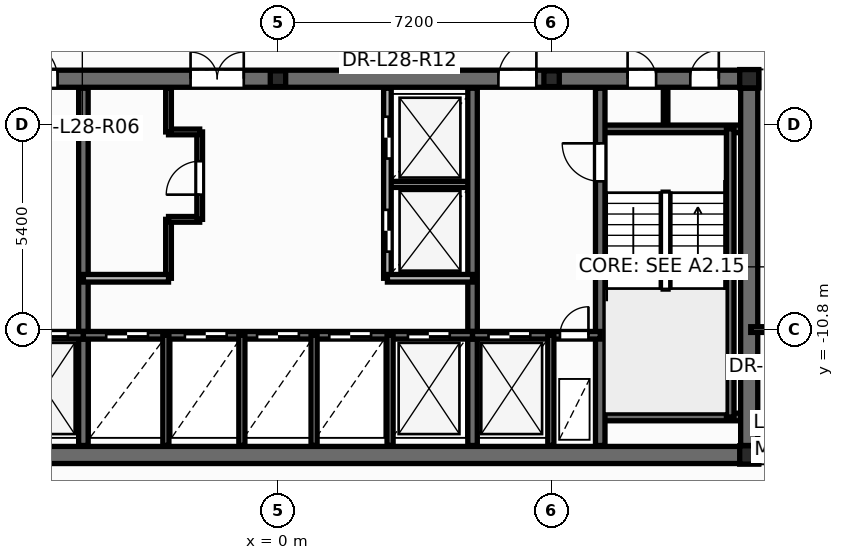
"""IFC4 building model, lengths in metres.
Left out: names, types, materials, properties, quantities, classifications, styles, units other than length and angle.
Written with IfcOpenShell. Run it as: python <this file> out.ifc"""

import sys

from ifc_helpers import new_model, si_unit, direction, frame, frame_2d, origin, origin_2d, place, context, subcontext, project, spatial, rectangle, i_section, extrude, element, fill, save


model = new_model("IFC4")
c1 = context("Model", 3, precision=1e-05, world=origin(), true_north=direction((0.0, 1.0)))
c2 = subcontext(c1, "Body", "Model", "MODEL_VIEW")
j1 = project(units=[si_unit("LENGTHUNIT", "METRE"), si_unit("PLANEANGLEUNIT", "RADIAN")], contexts=[c1])
p1 = place(None, origin())
s1 = spatial("IfcSite", under=j1, at=p1, CompositionType="ELEMENT")
p2 = place(p1, origin())
s2 = spatial("IfcBuilding", under=s1, at=p2, CompositionType="ELEMENT")
p3 = place(p2, frame((0.0, 0.0, 110.4)))
s3 = spatial("IfcBuildingStorey", under=s2, at=p3, CompositionType="ELEMENT", Elevation=110.4)
for number, where, z_axis, x_axis in (
    (1, (12.4, -14.1, 0.0), (0.0, 0.0, 1.0), (1.0, 0.0, 0.0)),
    (2, (12.4, -4.2, 0.0), (0.0, 0.0, 1.0), (1.0, 0.0, 0.0)),
):
    element("IfcColumn", number, at=place(p3, frame(where, z_axis=z_axis, x_axis=x_axis)), inside=s3, PredefinedType="COLUMN", context=c2, shape_type="SweptSolid", body=[
        extrude(i_section(OverallWidth=0.5, OverallDepth=0.482, WebThickness=0.04, FlangeThickness=0.045, at=origin_2d()), origin(), (0.0, 0.0, 1.0), 3.6),
    ])
for number, where, z_axis, x_axis in (
    (3, (0.0, -4.2, 0.0), (0.0, 0.0, 1.0), (1.0, 0.0, 0.0)),
    (4, (7.2, -4.2, 0.0), (0.0, 0.0, 1.0), (1.0, 0.0, 0.0)),
):
    element("IfcColumn", number, at=place(p3, frame(where, z_axis=z_axis, x_axis=x_axis)), inside=s3, PredefinedType="PILASTER", context=c2, shape_type="SweptSolid", body=[
        extrude(i_section(OverallWidth=0.405, OverallDepth=0.414, WebThickness=0.022, FlangeThickness=0.032, at=origin_2d()), origin(), (0.0, 0.0, 1.0), 3.6),
    ])
p4 = place(p3, frame((-2.88, -9.45, 0.0), z_axis=(0.0, 0.0, 1.0), x_axis=(0.0, 1.0, 0.0)))
e5 = element("IfcWall", 5, at=p4, inside=s3, PredefinedType="PARTITIONING", context=c2, shape_type="SweptSolid", body=[
    extrude(rectangle(XDim=1.55, YDim=0.15, at=frame_2d((0.775, 0.0))), origin(), (0.0, 0.0, 1.0), 3.35),
])
p5 = place(p3, frame((-2.88, -7.9, 0.0), z_axis=(0.0, 0.0, 1.0), x_axis=(1.0, 0.0, 0.0)))
e6 = element("IfcWall", 6, at=p5, inside=s3, PredefinedType="PARTITIONING", context=c2, shape_type="SweptSolid", body=[
    extrude(rectangle(XDim=0.82, YDim=0.15, at=frame_2d((0.41, 0.0))), origin(), (0.0, 0.0, 1.0), 3.35),
])
p6 = place(p3, frame((-2.06, -7.9, 0.0), z_axis=(0.0, 0.0, 1.0), x_axis=(0.0, 1.0, 0.0)))
e7 = element("IfcWall", 7, at=p6, inside=s3, PredefinedType="PARTITIONING", context=c2, shape_type="SweptSolid", body=[
    extrude(rectangle(XDim=2.3, YDim=0.15, at=frame_2d((1.15, 0.0))), origin(), (0.0, 0.0, 1.0), 3.35),
])
p7 = place(p6, frame((0.65, 0.0, 0.0)))
e8 = element("IfcOpeningElement", 8, at=p7, cuts=e7, PredefinedType="OPENING", context=c2, shape_type="SweptSolid", body=[
    extrude(rectangle(XDim=0.886, YDim=2.104, at=frame_2d((0.44, 1.052))), frame((0.0, 0.085, 0.0), z_axis=(0.0, -1.0, 0.0), x_axis=(1.0, 0.0, 0.0)), (0.0, 0.0, 1.0), 0.17),
])
p8 = place(p3, frame((-2.88, -5.6, 0.0), z_axis=(0.0, 0.0, 1.0), x_axis=(1.0, 0.0, 0.0)))
e9 = element("IfcWall", 9, at=p8, inside=s3, PredefinedType="PARTITIONING", context=c2, shape_type="SweptSolid", body=[
    extrude(rectangle(XDim=0.82, YDim=0.15, at=frame_2d((0.41, 0.0))), origin(), (0.0, 0.0, 1.0), 3.35),
])
p9 = place(p3, frame((-2.88, -5.6, 0.0), z_axis=(0.0, 0.0, 1.0), x_axis=(0.0, 1.0, 0.0)))
e10 = element("IfcWall", 10, at=p9, inside=s3, PredefinedType="PARTITIONING", context=c2, shape_type="SweptSolid", body=[
    extrude(rectangle(XDim=1.15, YDim=0.15, at=frame_2d((0.575, 0.0))), origin(), (0.0, 0.0, 1.0), 3.35),
])
p10 = place(p3, frame((2.88, -6.98, 0.0), z_axis=(0.0, 0.0, 1.0), x_axis=(1.0, 0.0, 0.0)))
e11 = element("IfcWall", 11, at=p10, inside=s3, PredefinedType="PARTITIONING", context=c2, shape_type="SweptSolid", body=[
    extrude(rectangle(XDim=2.24, YDim=0.16, at=frame_2d((1.12, 0.0))), origin(), (0.0, 0.0, 1.0), 3.35),
])
p11 = place(p3, frame((10.2, -5.52, 0.0), z_axis=(0.0, 0.0, 1.0), x_axis=(0.0, 1.0, 0.0)))
e12 = element("IfcWall", 12, at=p11, inside=s3, PredefinedType="PARTITIONING", context=c2, shape_type="SweptSolid", body=[
    extrude(rectangle(XDim=1.12, YDim=0.12, at=frame_2d((0.56, 0.0))), origin(), (0.0, 0.0, 1.0), 3.35),
])
p12 = place(p3, frame((-12.65, -14.1, 0.0), z_axis=(0.0, 0.0, 1.0), x_axis=(1.0, 0.0, 0.0)))
e13 = element("IfcWall", 13, at=p12, inside=s3, PredefinedType="SHEAR", context=c2, shape_type="SweptSolid", body=[
    extrude(rectangle(XDim=25.3, YDim=0.45, at=frame_2d((12.65, 0.0))), origin(), (0.0, 0.0, 1.0), 3.6),
])
p13 = place(p3, frame((-12.65, -4.2, 0.0), z_axis=(0.0, 0.0, 1.0), x_axis=(1.0, 0.0, 0.0)))
e14 = element("IfcWall", 14, at=p13, inside=s3, PredefinedType="SHEAR", context=c2, shape_type="SweptSolid", body=[
    extrude(rectangle(XDim=25.3, YDim=0.45, at=frame_2d((12.65, 0.0))), origin(), (0.0, 0.0, 1.0), 3.6),
])
p14 = place(p13, frame((1.85, 0.0, 0.0)))
e15 = element("IfcOpeningElement", 15, at=p14, cuts=e14, PredefinedType="OPENING", context=c2, shape_type="SweptSolid", body=[
    extrude(rectangle(XDim=0.756, YDim=2.054, at=frame_2d((0.375, 1.027))), frame((0.0, 0.235, 0.0), z_axis=(0.0, -1.0, 0.0), x_axis=(1.0, 0.0, 0.0)), (0.0, 0.0, 1.0), 0.47),
])
p15 = place(p13, frame((21.85, 0.0, 0.0)))
e16 = element("IfcOpeningElement", 16, at=p15, cuts=e14, PredefinedType="OPENING", context=c2, shape_type="SweptSolid", body=[
    extrude(rectangle(XDim=0.756, YDim=2.054, at=frame_2d((0.375, 1.027))), frame((0.0, 0.235, 0.0), z_axis=(0.0, -1.0, 0.0), x_axis=(1.0, 0.0, 0.0)), (0.0, 0.0, 1.0), 0.47),
])
p16 = place(p13, frame((23.5, 0.0, 0.0)))
e17 = element("IfcOpeningElement", 17, at=p16, cuts=e14, PredefinedType="OPENING", context=c2, shape_type="SweptSolid", body=[
    extrude(rectangle(XDim=0.756, YDim=2.054, at=frame_2d((0.375, 1.027))), frame((0.0, 0.235, 0.0), z_axis=(0.0, -1.0, 0.0), x_axis=(1.0, 0.0, 0.0)), (0.0, 0.0, 1.0), 0.47),
])
p17 = place(p13, frame((5.85, 0.0, 0.0)))
e18 = element("IfcOpeningElement", 18, at=p17, cuts=e14, PredefinedType="OPENING", context=c2, shape_type="SweptSolid", body=[
    extrude(rectangle(XDim=1.006, YDim=2.104, at=frame_2d((0.5, 1.052))), frame((0.0, 0.235, 0.0), z_axis=(0.0, -1.0, 0.0), x_axis=(1.0, 0.0, 0.0)), (0.0, 0.0, 1.0), 0.47),
])
p18 = place(p13, frame((10.35, 0.0, 0.0)))
e19 = element("IfcOpeningElement", 19, at=p18, cuts=e14, PredefinedType="OPENING", context=c2, shape_type="SweptSolid", body=[
    extrude(rectangle(XDim=1.406, YDim=2.154, at=frame_2d((0.7, 1.077))), frame((0.0, 0.235, 0.0), z_axis=(0.0, -1.0, 0.0), x_axis=(1.0, 0.0, 0.0)), (0.0, 0.0, 1.0), 0.47),
])
p19 = place(p13, frame((18.45, 0.0, 0.0)))
e20 = element("IfcOpeningElement", 20, at=p19, cuts=e14, PredefinedType="OPENING", context=c2, shape_type="SweptSolid", body=[
    extrude(rectangle(XDim=1.006, YDim=2.104, at=frame_2d((0.5, 1.052))), frame((0.0, 0.235, 0.0), z_axis=(0.0, -1.0, 0.0), x_axis=(1.0, 0.0, 0.0)), (0.0, 0.0, 1.0), 0.47),
])
for number, where, z_axis, x_axis in (
    (21, (8.48, -5.52, 0.0), (0.0, 0.0, 1.0), (1.0, 0.0, 0.0)),
    (22, (8.48, -13.1, 0.0), (0.0, 0.0, 1.0), (1.0, 0.0, 0.0)),
):
    element("IfcWall", number, at=place(p3, frame(where, z_axis=z_axis, x_axis=x_axis)), inside=s3, PredefinedType="SOLIDWALL", context=c2, shape_type="SweptSolid", body=[
        extrude(rectangle(XDim=3.87, YDim=0.2, at=frame_2d((1.935, 0.0))), origin(), (0.0, 0.0, 1.0), 3.6),
    ])
p20 = place(p3, frame((11.9, -13.1, 0.0), z_axis=(0.0, 0.0, 1.0), x_axis=(0.0, 1.0, 0.0)))
e23 = element("IfcWall", 23, at=p20, inside=s3, PredefinedType="SOLIDWALL", context=c2, shape_type="SweptSolid", body=[
    extrude(rectangle(XDim=7.58, YDim=0.2, at=frame_2d((3.79, 0.0))), origin(), (0.0, 0.0, 1.0), 3.6),
])
p21 = place(p3, frame((8.48, -13.85, 0.0), z_axis=(0.0, 0.0, 1.0), x_axis=(0.0, 1.0, 0.0)))
e24 = element("IfcWall", 24, at=p21, inside=s3, PredefinedType="SHEAR", context=c2, shape_type="SweptSolid", body=[
    extrude(rectangle(XDim=9.4, YDim=0.25, at=frame_2d((4.7, 0.0))), origin(), (0.0, 0.0, 1.0), 3.6),
])
p22 = place(p21, frame((6.95, 0.0, 0.0)))
e25 = element("IfcOpeningElement", 25, at=p22, cuts=e24, PredefinedType="OPENING", context=c2, shape_type="SweptSolid", body=[
    extrude(rectangle(XDim=1.006, YDim=2.104, at=frame_2d((0.5, 1.052))), frame((0.0, 0.135, 0.0), z_axis=(0.0, -1.0, 0.0), x_axis=(1.0, 0.0, 0.0)), (0.0, 0.0, 1.0), 0.27),
])
for number, where, z_axis, x_axis in (
    (26, (-5.12, -13.85, 0.0), (0.0, 0.0, 1.0), (0.0, 1.0, 0.0)),
    (27, (5.12, -13.85, 0.0), (0.0, 0.0, 1.0), (0.0, 1.0, 0.0)),
):
    element("IfcWall", number, at=place(p3, frame(where, z_axis=z_axis, x_axis=x_axis)), inside=s3, PredefinedType="SHEAR", context=c2, shape_type="SweptSolid", body=[
        extrude(rectangle(XDim=9.4, YDim=0.25, at=frame_2d((4.7, 0.0))), origin(), (0.0, 0.0, 1.0), 3.6),
    ])
p23 = place(p3, frame((-8.48, -10.95, 0.0), z_axis=(0.0, 0.0, 1.0), x_axis=(1.0, 0.0, 0.0)))
e28 = element("IfcWall", 28, at=p23, inside=s3, PredefinedType="SOLIDWALL", context=c2, shape_type="SweptSolid", body=[
    extrude(rectangle(XDim=3.36, YDim=0.2, at=frame_2d((1.68, 0.0))), origin(), (0.0, 0.0, 1.0), 3.6),
])
p24 = place(p23, frame((0.28, 0.0, 0.0)))
e29 = element("IfcOpeningElement", 29, at=p24, cuts=e28, PredefinedType="OPENING", context=c2, shape_type="SweptSolid", body=[
    extrude(rectangle(XDim=0.756, YDim=2.054, at=frame_2d((0.375, 1.027))), frame((0.0, 0.11, 0.0), z_axis=(0.0, -1.0, 0.0), x_axis=(1.0, 0.0, 0.0)), (0.0, 0.0, 1.0), 0.22),
])
p25 = place(p23, frame((1.85, 0.0, 0.0)))
e30 = element("IfcOpeningElement", 30, at=p25, cuts=e28, PredefinedType="OPENING", context=c2, shape_type="SweptSolid", body=[
    extrude(rectangle(XDim=1.106, YDim=2.104, at=frame_2d((0.55, 1.052))), frame((0.0, 0.11, 0.0), z_axis=(0.0, -1.0, 0.0), x_axis=(1.0, 0.0, 0.0)), (0.0, 0.0, 1.0), 0.22),
])
p26 = place(p3, frame((-5.12, -10.95, 0.0), z_axis=(0.0, 0.0, 1.0), x_axis=(1.0, 0.0, 0.0)))
e31 = element("IfcWall", 31, at=p26, inside=s3, PredefinedType="SOLIDWALL", context=c2, shape_type="SweptSolid", body=[
    extrude(rectangle(XDim=10.24, YDim=0.2, at=frame_2d((5.12, 0.0))), origin(), (0.0, 0.0, 1.0), 3.6),
])
p27 = place(p26, frame((0.6, 0.0, 0.0)))
e32 = element("IfcOpeningElement", 32, at=p27, cuts=e31, PredefinedType="OPENING", context=c2, shape_type="SweptSolid", body=[
    extrude(rectangle(XDim=1.106, YDim=2.104, at=frame_2d((0.55, 1.052))), frame((0.0, 0.11, 0.0), z_axis=(0.0, -1.0, 0.0), x_axis=(1.0, 0.0, 0.0)), (0.0, 0.0, 1.0), 0.22),
])
p28 = place(p26, frame((2.67, 0.0, 0.0)))
e33 = element("IfcOpeningElement", 33, at=p28, cuts=e31, PredefinedType="OPENING", context=c2, shape_type="SweptSolid", body=[
    extrude(rectangle(XDim=1.106, YDim=2.104, at=frame_2d((0.55, 1.052))), frame((0.0, 0.11, 0.0), z_axis=(0.0, -1.0, 0.0), x_axis=(1.0, 0.0, 0.0)), (0.0, 0.0, 1.0), 0.22),
])
p29 = place(p26, frame((4.57, 0.0, 0.0)))
e34 = element("IfcOpeningElement", 34, at=p29, cuts=e31, PredefinedType="OPENING", context=c2, shape_type="SweptSolid", body=[
    extrude(rectangle(XDim=1.106, YDim=2.104, at=frame_2d((0.55, 1.052))), frame((0.0, 0.11, 0.0), z_axis=(0.0, -1.0, 0.0), x_axis=(1.0, 0.0, 0.0)), (0.0, 0.0, 1.0), 0.22),
])
p30 = place(p26, frame((6.47, 0.0, 0.0)))
e35 = element("IfcOpeningElement", 35, at=p30, cuts=e31, PredefinedType="OPENING", context=c2, shape_type="SweptSolid", body=[
    extrude(rectangle(XDim=1.106, YDim=2.104, at=frame_2d((0.55, 1.052))), frame((0.0, 0.11, 0.0), z_axis=(0.0, -1.0, 0.0), x_axis=(1.0, 0.0, 0.0)), (0.0, 0.0, 1.0), 0.22),
])
p31 = place(p26, frame((8.54, 0.0, 0.0)))
e36 = element("IfcOpeningElement", 36, at=p31, cuts=e31, PredefinedType="OPENING", context=c2, shape_type="SweptSolid", body=[
    extrude(rectangle(XDim=1.106, YDim=2.104, at=frame_2d((0.55, 1.052))), frame((0.0, 0.11, 0.0), z_axis=(0.0, -1.0, 0.0), x_axis=(1.0, 0.0, 0.0)), (0.0, 0.0, 1.0), 0.22),
])
p32 = place(p3, frame((5.12, -10.95, 0.0), z_axis=(0.0, 0.0, 1.0), x_axis=(1.0, 0.0, 0.0)))
e37 = element("IfcWall", 37, at=p32, inside=s3, PredefinedType="SOLIDWALL", context=c2, shape_type="SweptSolid", body=[
    extrude(rectangle(XDim=3.36, YDim=0.2, at=frame_2d((1.68, 0.0))), origin(), (0.0, 0.0, 1.0), 3.6),
])
p33 = place(p32, frame((0.42, 0.0, 0.0)))
e38 = element("IfcOpeningElement", 38, at=p33, cuts=e37, PredefinedType="OPENING", context=c2, shape_type="SweptSolid", body=[
    extrude(rectangle(XDim=1.106, YDim=2.104, at=frame_2d((0.55, 1.052))), frame((0.0, 0.11, 0.0), z_axis=(0.0, -1.0, 0.0), x_axis=(1.0, 0.0, 0.0)), (0.0, 0.0, 1.0), 0.22),
])
p34 = place(p32, frame((2.3, 0.0, 0.0)))
e39 = element("IfcOpeningElement", 39, at=p34, cuts=e37, PredefinedType="OPENING", context=c2, shape_type="SweptSolid", body=[
    extrude(rectangle(XDim=0.756, YDim=2.054, at=frame_2d((0.375, 1.027))), frame((0.0, 0.11, 0.0), z_axis=(0.0, -1.0, 0.0), x_axis=(1.0, 0.0, 0.0)), (0.0, 0.0, 1.0), 0.22),
])
for number, where, z_axis, x_axis in (
    (40, (7.18, -13.85, 0.0), (0.0, 0.0, 1.0), (0.0, 1.0, 0.0)),
    (41, (-2.95, -13.85, 0.0), (0.0, 0.0, 1.0), (0.0, 1.0, 0.0)),
    (42, (2.95, -13.85, 0.0), (0.0, 0.0, 1.0), (0.0, 1.0, 0.0)),
):
    element("IfcWall", number, at=place(p3, frame(where, z_axis=z_axis, x_axis=x_axis)), inside=s3, PredefinedType="PARTITIONING", context=c2, shape_type="SweptSolid", body=[
        extrude(rectangle(XDim=2.9, YDim=0.16, at=frame_2d((1.45, 0.0))), origin(), (0.0, 0.0, 1.0), 2.375),
    ])
p35 = place(p3, frame((12.4, -13.85, 0.0), z_axis=(0.0, 0.0, 1.0), x_axis=(0.0, 1.0, 0.0)))
e43 = element("IfcWall", 43, at=p35, inside=s3, PredefinedType="SHEAR", context=c2, shape_type="SweptSolid", body=[
    extrude(rectangle(XDim=9.4, YDim=0.45, at=frame_2d((4.7, 0.0))), origin(), (0.0, 0.0, 1.0), 3.6),
])
p36 = place(p3, frame((-5.12, -9.45, 0.0), z_axis=(0.0, 0.0, 1.0), x_axis=(1.0, 0.0, 0.0)))
e44 = element("IfcWall", 44, at=p36, inside=s3, PredefinedType="SOLIDWALL", context=c2, shape_type="SweptSolid", body=[
    extrude(rectangle(XDim=2.24, YDim=0.2, at=frame_2d((1.12, 0.0))), origin(), (0.0, 0.0, 1.0), 3.35),
])
p37 = place(p3, frame((2.88, -9.45, 0.0), z_axis=(0.0, 0.0, 1.0), x_axis=(0.0, 1.0, 0.0)))
e45 = element("IfcWall", 45, at=p37, inside=s3, PredefinedType="SOLIDWALL", context=c2, shape_type="SweptSolid", body=[
    extrude(rectangle(XDim=5.0, YDim=0.2, at=frame_2d((2.5, 0.0))), origin(), (0.0, 0.0, 1.0), 3.35),
])
p38 = place(p37, frame((0.7, 0.0, 0.0)))
e46 = element("IfcOpeningElement", 46, at=p38, cuts=e45, PredefinedType="OPENING", context=c2, shape_type="SweptSolid", body=[
    extrude(rectangle(XDim=1.106, YDim=2.104, at=frame_2d((0.55, 1.052))), frame((0.0, 0.11, 0.0), z_axis=(0.0, -1.0, 0.0), x_axis=(1.0, 0.0, 0.0)), (0.0, 0.0, 1.0), 0.22),
])
p39 = place(p37, frame((3.15, 0.0, 0.0)))
e47 = element("IfcOpeningElement", 47, at=p39, cuts=e45, PredefinedType="OPENING", context=c2, shape_type="SweptSolid", body=[
    extrude(rectangle(XDim=1.106, YDim=2.104, at=frame_2d((0.55, 1.052))), frame((0.0, 0.11, 0.0), z_axis=(0.0, -1.0, 0.0), x_axis=(1.0, 0.0, 0.0)), (0.0, 0.0, 1.0), 0.22),
])
p40 = place(p3, frame((2.88, -9.45, 0.0), z_axis=(0.0, 0.0, 1.0), x_axis=(1.0, 0.0, 0.0)))
e48 = element("IfcWall", 48, at=p40, inside=s3, PredefinedType="SOLIDWALL", context=c2, shape_type="SweptSolid", body=[
    extrude(rectangle(XDim=2.24, YDim=0.2, at=frame_2d((1.12, 0.0))), origin(), (0.0, 0.0, 1.0), 3.35),
])
for number, where, z_axis, x_axis in (
    (49, (-0.95, -13.85, 0.0), (0.0, 0.0, 1.0), (0.0, 1.0, 0.0)),
    (50, (0.95, -13.85, 0.0), (0.0, 0.0, 1.0), (0.0, 1.0, 0.0)),
):
    element("IfcWall", number, at=place(p3, frame(where, z_axis=z_axis, x_axis=x_axis)), inside=s3, PredefinedType="PARTITIONING", context=c2, shape_type="SweptSolid", body=[
        extrude(rectangle(XDim=2.9, YDim=0.16, at=frame_2d((1.45, 0.0))), origin(), (0.0, 0.0, 1.0), 2.375),
    ])
p41 = place(p3, frame((12.44, -10.8, 0.0), z_axis=(0.0, 0.0, 1.0), x_axis=(1.0, 0.0, 0.0)))
e51 = element("IfcWall", 51, at=p41, inside=s3, PredefinedType="PARTITIONING", context=c2, shape_type="SweptSolid", body=[
    extrude(rectangle(XDim=2.2, YDim=0.15, at=frame_2d((1.1, 0.0))), origin(), (0.0, 0.0, 1.0), 2.713),
])
p42 = place(p41, frame((0.459, 0.0, 0.0)))
e52 = element("IfcOpeningElement", 52, at=p42, cuts=e51, PredefinedType="OPENING", context=c2, shape_type="SweptSolid", body=[
    extrude(rectangle(XDim=0.956, YDim=2.104, at=frame_2d((0.475, 1.052))), frame((0.0, 0.085, 0.0), z_axis=(0.0, -1.0, 0.0), x_axis=(1.0, 0.0, 0.0)), (0.0, 0.0, 1.0), 0.17),
])
p43 = place(p7, origin())
e53 = element("IfcDoor", 53, at=p43, inside=s3, OperationType="SINGLE_SWING_LEFT", PredefinedType="DOOR", context=c2, shape_type="SweptSolid", body=[
    extrude(rectangle(XDim=0.88, YDim=2.1, at=frame_2d((0.44, 1.05))), frame((0.0, 0.025, 0.0), z_axis=(0.0, -1.0, 0.0), x_axis=(1.0, 0.0, 0.0)), (0.0, 0.0, 1.0), 0.05),
])
fill(e8, e53)
p44 = place(p38, origin())
e54 = element("IfcDoor", 54, at=p44, inside=s3, OperationType="DOUBLE_DOOR_SLIDING", PredefinedType="DOOR", context=c2, shape_type="SweptSolid", body=[
    extrude(rectangle(XDim=1.1, YDim=2.1, at=frame_2d((0.55, 1.05))), frame((0.0, 0.025, 0.0), z_axis=(0.0, -1.0, 0.0), x_axis=(1.0, 0.0, 0.0)), (0.0, 0.0, 1.0), 0.05),
])
fill(e46, e54)
p45 = place(p39, origin())
e55 = element("IfcDoor", 55, at=p45, inside=s3, OperationType="DOUBLE_DOOR_SLIDING", PredefinedType="DOOR", context=c2, shape_type="SweptSolid", body=[
    extrude(rectangle(XDim=1.1, YDim=2.1, at=frame_2d((0.55, 1.05))), frame((0.0, 0.025, 0.0), z_axis=(0.0, -1.0, 0.0), x_axis=(1.0, 0.0, 0.0)), (0.0, 0.0, 1.0), 0.05),
])
fill(e47, e55)
p46 = place(p22, origin())
e56 = element("IfcDoor", 56, at=p46, inside=s3, OperationType="SINGLE_SWING_RIGHT", PredefinedType="DOOR", context=c2, shape_type="SweptSolid", body=[
    extrude(rectangle(XDim=1.0, YDim=2.1, at=frame_2d((0.5, 1.05))), frame((0.0, 0.025, 0.0), z_axis=(0.0, -1.0, 0.0), x_axis=(1.0, 0.0, 0.0)), (0.0, 0.0, 1.0), 0.05),
])
fill(e25, e56)
p47 = place(p25, origin())
e57 = element("IfcDoor", 57, at=p47, inside=s3, OperationType="DOUBLE_DOOR_SLIDING", PredefinedType="DOOR", context=c2, shape_type="SweptSolid", body=[
    extrude(rectangle(XDim=1.1, YDim=2.1, at=frame_2d((0.55, 1.05))), frame((0.0, 0.025, 0.0), z_axis=(0.0, -1.0, 0.0), x_axis=(1.0, 0.0, 0.0)), (0.0, 0.0, 1.0), 0.05),
])
fill(e30, e57)
p48 = place(p33, origin())
e58 = element("IfcDoor", 58, at=p48, inside=s3, OperationType="DOUBLE_DOOR_SLIDING", PredefinedType="DOOR", context=c2, shape_type="SweptSolid", body=[
    extrude(rectangle(XDim=1.1, YDim=2.1, at=frame_2d((0.55, 1.05))), frame((0.0, 0.025, 0.0), z_axis=(0.0, -1.0, 0.0), x_axis=(1.0, 0.0, 0.0)), (0.0, 0.0, 1.0), 0.05),
])
fill(e38, e58)
p49 = place(p34, origin())
e59 = element("IfcDoor", 59, at=p49, inside=s3, OperationType="SINGLE_SWING_RIGHT", PredefinedType="DOOR", context=c2, shape_type="SweptSolid", body=[
    extrude(rectangle(XDim=0.75, YDim=2.05, at=frame_2d((0.375, 1.025))), frame((0.0, 0.025, 0.0), z_axis=(0.0, -1.0, 0.0), x_axis=(1.0, 0.0, 0.0)), (0.0, 0.0, 1.0), 0.05),
])
fill(e39, e59)
p50 = place(p27, origin())
e60 = element("IfcDoor", 60, at=p50, inside=s3, OperationType="DOUBLE_DOOR_SLIDING", PredefinedType="DOOR", context=c2, shape_type="SweptSolid", body=[
    extrude(rectangle(XDim=1.1, YDim=2.1, at=frame_2d((0.55, 1.05))), frame((0.0, 0.025, 0.0), z_axis=(0.0, -1.0, 0.0), x_axis=(1.0, 0.0, 0.0)), (0.0, 0.0, 1.0), 0.05),
])
fill(e32, e60)
p51 = place(p28, origin())
e61 = element("IfcDoor", 61, at=p51, inside=s3, OperationType="DOUBLE_DOOR_SLIDING", PredefinedType="DOOR", context=c2, shape_type="SweptSolid", body=[
    extrude(rectangle(XDim=1.1, YDim=2.1, at=frame_2d((0.55, 1.05))), frame((0.0, 0.025, 0.0), z_axis=(0.0, -1.0, 0.0), x_axis=(1.0, 0.0, 0.0)), (0.0, 0.0, 1.0), 0.05),
])
fill(e33, e61)
p52 = place(p29, origin())
e62 = element("IfcDoor", 62, at=p52, inside=s3, OperationType="DOUBLE_DOOR_SLIDING", PredefinedType="DOOR", context=c2, shape_type="SweptSolid", body=[
    extrude(rectangle(XDim=1.1, YDim=2.1, at=frame_2d((0.55, 1.05))), frame((0.0, 0.025, 0.0), z_axis=(0.0, -1.0, 0.0), x_axis=(1.0, 0.0, 0.0)), (0.0, 0.0, 1.0), 0.05),
])
fill(e34, e62)
p53 = place(p30, origin())
e63 = element("IfcDoor", 63, at=p53, inside=s3, OperationType="DOUBLE_DOOR_SLIDING", PredefinedType="DOOR", context=c2, shape_type="SweptSolid", body=[
    extrude(rectangle(XDim=1.1, YDim=2.1, at=frame_2d((0.55, 1.05))), frame((0.0, 0.025, 0.0), z_axis=(0.0, -1.0, 0.0), x_axis=(1.0, 0.0, 0.0)), (0.0, 0.0, 1.0), 0.05),
])
fill(e35, e63)
p54 = place(p31, origin())
e64 = element("IfcDoor", 64, at=p54, inside=s3, OperationType="DOUBLE_DOOR_SLIDING", PredefinedType="DOOR", context=c2, shape_type="SweptSolid", body=[
    extrude(rectangle(XDim=1.1, YDim=2.1, at=frame_2d((0.55, 1.05))), frame((0.0, 0.025, 0.0), z_axis=(0.0, -1.0, 0.0), x_axis=(1.0, 0.0, 0.0)), (0.0, 0.0, 1.0), 0.05),
])
fill(e36, e64)
p55 = place(p15, origin())
e65 = element("IfcDoor", 65, at=p55, inside=s3, OperationType="SINGLE_SWING_LEFT", PredefinedType="DOOR", context=c2, shape_type="SweptSolid", body=[
    extrude(rectangle(XDim=0.75, YDim=2.05, at=frame_2d((0.375, 1.025))), frame((0.0, 0.025, 0.0), z_axis=(0.0, -1.0, 0.0), x_axis=(1.0, 0.0, 0.0)), (0.0, 0.0, 1.0), 0.05),
])
fill(e16, e65)
p56 = place(p16, origin())
e66 = element("IfcDoor", 66, at=p56, inside=s3, OperationType="SINGLE_SWING_RIGHT", PredefinedType="DOOR", context=c2, shape_type="SweptSolid", body=[
    extrude(rectangle(XDim=0.75, YDim=2.05, at=frame_2d((0.375, 1.025))), frame((0.0, 0.025, 0.0), z_axis=(0.0, -1.0, 0.0), x_axis=(1.0, 0.0, 0.0)), (0.0, 0.0, 1.0), 0.05),
])
fill(e17, e66)
p57 = place(p17, origin())
e67 = element("IfcDoor", 67, at=p57, inside=s3, OperationType="SINGLE_SWING_LEFT", PredefinedType="DOOR", context=c2, shape_type="SweptSolid", body=[
    extrude(rectangle(XDim=1.0, YDim=2.1, at=frame_2d((0.5, 1.05))), frame((0.0, 0.025, 0.0), z_axis=(0.0, -1.0, 0.0), x_axis=(1.0, 0.0, 0.0)), (0.0, 0.0, 1.0), 0.05),
])
fill(e18, e67)
p58 = place(p18, origin())
e68 = element("IfcDoor", 68, at=p58, inside=s3, OperationType="DOUBLE_DOOR_SINGLE_SWING", PredefinedType="DOOR", context=c2, shape_type="SweptSolid", body=[
    extrude(rectangle(XDim=1.4, YDim=2.15, at=frame_2d((0.7, 1.075))), frame((0.0, 0.025, 0.0), z_axis=(0.0, -1.0, 0.0), x_axis=(1.0, 0.0, 0.0)), (0.0, 0.0, 1.0), 0.05),
])
fill(e19, e68)
p59 = place(p19, origin())
e69 = element("IfcDoor", 69, at=p59, inside=s3, OperationType="SINGLE_SWING_RIGHT", PredefinedType="DOOR", context=c2, shape_type="SweptSolid", body=[
    extrude(rectangle(XDim=1.0, YDim=2.1, at=frame_2d((0.5, 1.05))), frame((0.0, 0.025, 0.0), z_axis=(0.0, -1.0, 0.0), x_axis=(1.0, 0.0, 0.0)), (0.0, 0.0, 1.0), 0.05),
])
fill(e20, e69)
save(model, sys.argv[1])
